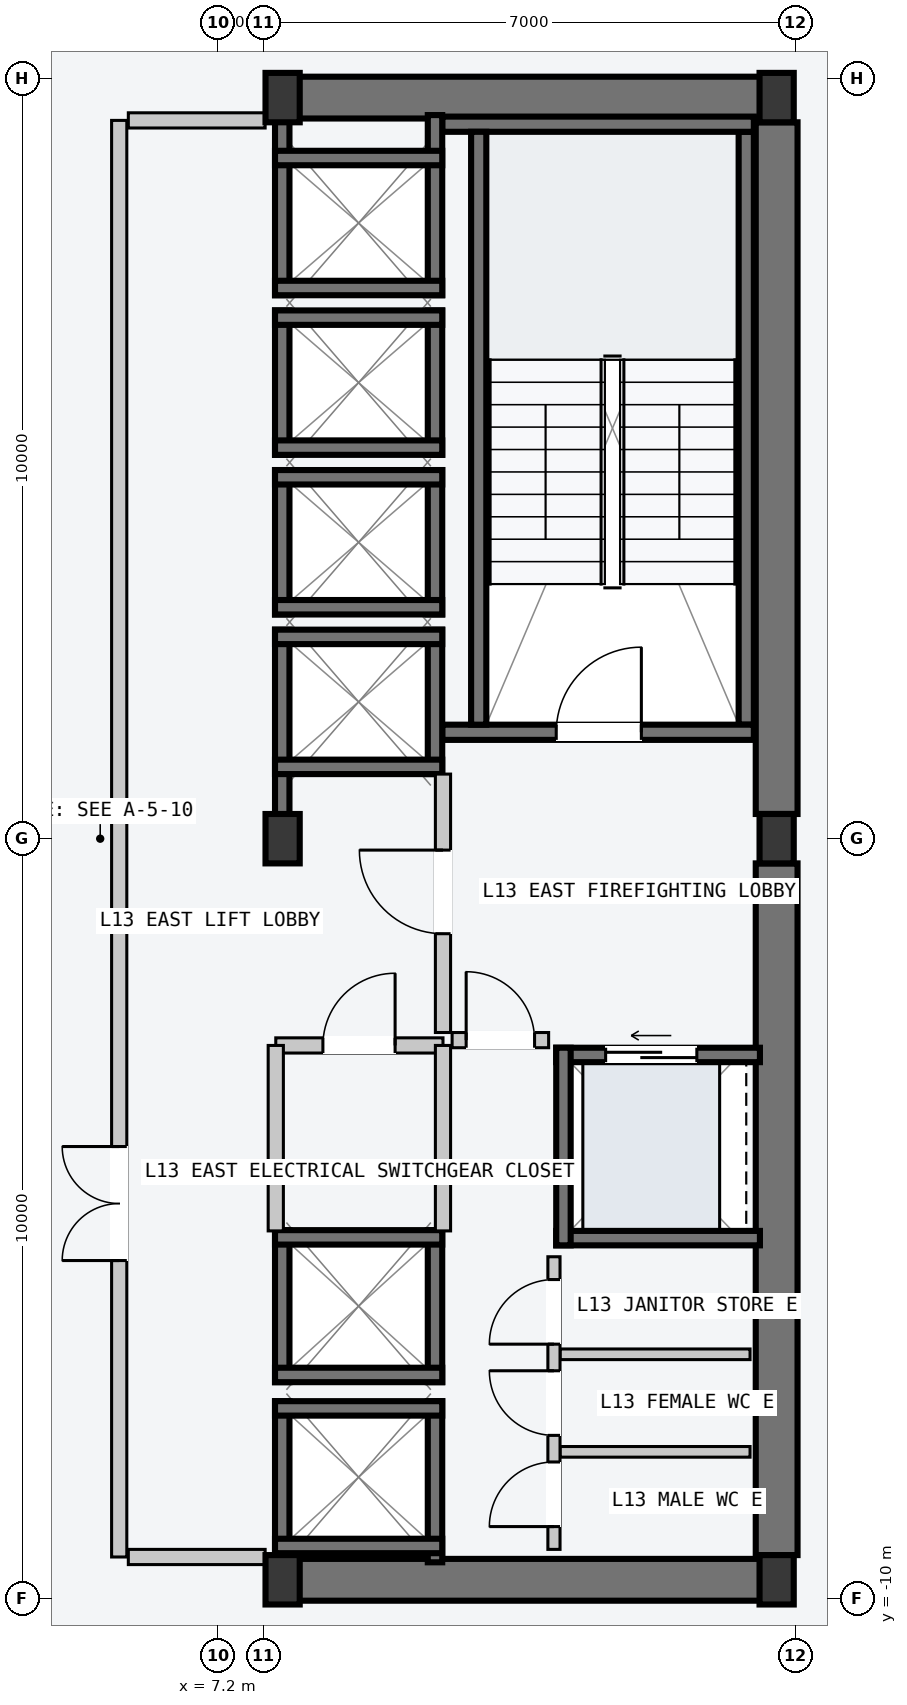
"""IFC4 building model, lengths in metres.
Left out: names, types, materials, properties, quantities, classifications, styles, units other than length and angle.
Written with IfcOpenShell. Run it as: python <this file> out.ifc"""

import sys

from ifc_helpers import new_model, si_unit, direction, frame, frame_2d, origin, origin_2d, place, context, subcontext, project, spatial, rectangle, i_section, extrude, element, fill, save


model = new_model("IFC4")
c1 = context("Model", 3, precision=1e-05, world=origin(), true_north=direction((0.0, 1.0)))
c2 = subcontext(c1, "Body", "Model", "MODEL_VIEW")
j1 = project(units=[si_unit("LENGTHUNIT", "METRE"), si_unit("PLANEANGLEUNIT", "RADIAN")], contexts=[c1])
p1 = place(None, origin())
s1 = spatial("IfcSite", under=j1, at=p1, CompositionType="ELEMENT")
p2 = place(p1, origin())
s2 = spatial("IfcBuilding", under=s1, at=p2, CompositionType="ELEMENT")
p3 = place(p2, frame((0.0, 0.0, 52.8)))
s3 = spatial("IfcBuildingStorey", under=s2, at=p3, CompositionType="ELEMENT", Elevation=52.8)
for number, where, z_axis, x_axis in (
    (1, (8.07, -9.75, -0.2), (0.0, 0.0, 1.0), (1.0, 0.0, 0.0)),
    (2, (8.07, 9.75, -0.2), (0.0, 0.0, 1.0), (1.0, 0.0, 0.0)),
):
    element("IfcWall", number, at=place(p3, frame(where, z_axis=z_axis, x_axis=x_axis)), inside=s3, PredefinedType="SHEAR", context=c2, shape_type="SweptSolid", body=[
        extrude(rectangle(XDim=6.46, YDim=0.55, at=frame_2d((3.23, 0.0))), origin(), (0.0, 0.0, 1.0), 3.6),
    ])
for number, where, z_axis, x_axis in (
    (3, (14.55, -9.425, -0.2), (0.0, 0.0, 1.0), (0.0, 1.0, 0.0)),
    (4, (14.55, 0.325, -0.2), (0.0, 0.0, 1.0), (0.0, 1.0, 0.0)),
):
    element("IfcWall", number, at=place(p3, frame(where, z_axis=z_axis, x_axis=x_axis)), inside=s3, PredefinedType="SHEAR", context=c2, shape_type="SweptSolid", body=[
        extrude(rectangle(XDim=9.1, YDim=0.55, at=frame_2d((4.55, 0.0))), origin(), (0.0, 0.0, 1.0), 3.6),
    ])
p4 = place(p3, frame((14.15, 1.5, -0.2), z_axis=(0.0, 0.0, 1.0), x_axis=(0.0, 1.0, 0.0)))
e5 = element("IfcWall", 5, at=p4, inside=s3, PredefinedType="SOLIDWALL", context=c2, shape_type="SweptSolid", body=[
    extrude(rectangle(XDim=7.8, YDim=0.2, at=frame_2d((3.9, 0.0))), origin(), (0.0, 0.0, 1.0), 3.6),
])
p5 = place(p3, frame((10.15, 1.4, -0.2), z_axis=(0.0, 0.0, 1.0), x_axis=(1.0, 0.0, 0.0)))
e6 = element("IfcWall", 6, at=p5, inside=s3, PredefinedType="SOLIDWALL", context=c2, shape_type="SweptSolid", body=[
    extrude(rectangle(XDim=4.1, YDim=0.2, at=frame_2d((2.05, 0.0))), origin(), (0.0, 0.0, 1.0), 3.6),
])
p6 = place(p5, frame((1.5, 0.0, 0.2)))
e7 = element("IfcOpeningElement", 7, at=p6, cuts=e6, PredefinedType="OPENING", context=c2, shape_type="SweptSolid", body=[
    extrude(rectangle(XDim=1.12, YDim=2.18, at=frame_2d((0.56, 1.09))), frame((0.0, 0.11, 0.0), z_axis=(0.0, -1.0, 0.0), x_axis=(1.0, 0.0, 0.0)), (0.0, 0.0, 1.0), 0.22),
])
p7 = place(p3, frame((10.15, 9.4, -0.2), z_axis=(0.0, 0.0, 1.0), x_axis=(1.0, 0.0, 0.0)))
e8 = element("IfcWall", 8, at=p7, inside=s3, PredefinedType="SOLIDWALL", context=c2, shape_type="SweptSolid", body=[
    extrude(rectangle(XDim=4.1, YDim=0.2, at=frame_2d((2.05, 0.0))), origin(), (0.0, 0.0, 1.0), 3.6),
])
p8 = place(p3, frame((10.63, 1.5, -0.2), z_axis=(0.0, 0.0, 1.0), x_axis=(0.0, 1.0, 0.0)))
e9 = element("IfcWall", 9, at=p8, inside=s3, PredefinedType="SOLIDWALL", context=c2, shape_type="SweptSolid", body=[
    extrude(rectangle(XDim=7.8, YDim=0.2, at=frame_2d((3.9, 0.0))), origin(), (0.0, 0.0, 1.0), 3.6),
])
for number, where, z_axis, x_axis in (
    (10, (8.05, -9.75, 0.0), (0.0, 0.0, 1.0), (1.0, 0.0, 0.0)),
    (11, (8.05, 0.0, 0.0), (0.0, 0.0, 1.0), (1.0, 0.0, 0.0)),
    (12, (8.05, 9.75, 0.0), (0.0, 0.0, 1.0), (1.0, 0.0, 0.0)),
    (13, (14.55, -9.75, 0.0), (0.0, 0.0, 1.0), (1.0, 0.0, 0.0)),
    (14, (14.55, 0.0, 0.0), (0.0, 0.0, 1.0), (1.0, 0.0, 0.0)),
    (15, (14.55, 9.75, 0.0), (0.0, 0.0, 1.0), (1.0, 0.0, 0.0)),
):
    element("IfcColumn", number, at=place(p3, frame(where, z_axis=z_axis, x_axis=x_axis)), inside=s3, PredefinedType="COLUMN", context=c2, shape_type="SweptSolid", body=[
        extrude(i_section(OverallWidth=0.45, OverallDepth=0.65, WebThickness=0.025, FlangeThickness=0.04, at=origin_2d()), origin(), (0.0, 0.0, 1.0), 3.6),
    ])
p9 = place(p3, frame((8.045, 0.21, -0.2), z_axis=(0.0, 0.0, 1.0), x_axis=(0.0, 1.0, 0.0)))
e16 = element("IfcWall", 16, at=p9, inside=s3, PredefinedType="SOLIDWALL", context=c2, shape_type="SweptSolid", body=[
    extrude(rectangle(XDim=2.54, YDim=0.19, at=frame_2d((1.27, 0.0))), origin(), (0.0, 0.0, 1.0), 3.6),
])
p10 = place(p3, frame((10.055, 0.85, -0.2), z_axis=(0.0, 0.0, 1.0), x_axis=(0.0, 1.0, 0.0)))
e17 = element("IfcWall", 17, at=p10, inside=s3, PredefinedType="SOLIDWALL", context=c2, shape_type="SweptSolid", body=[
    extrude(rectangle(XDim=1.9, YDim=0.19, at=frame_2d((0.95, 0.0))), origin(), (0.0, 0.0, 1.0), 3.6),
])
for number, where, z_axis, x_axis in (
    (18, (7.95, 2.655, -0.2), (0.0, 0.0, 1.0), (1.0, 0.0, 0.0)),
    (19, (7.95, 0.945, -0.2), (0.0, 0.0, 1.0), (1.0, 0.0, 0.0)),
):
    element("IfcWall", number, at=place(p3, frame(where, z_axis=z_axis, x_axis=x_axis)), inside=s3, PredefinedType="SOLIDWALL", context=c2, shape_type="SweptSolid", body=[
        extrude(rectangle(XDim=2.2, YDim=0.19, at=frame_2d((1.1, 0.0))), origin(), (0.0, 0.0, 1.0), 3.6),
    ])
for number, where, z_axis, x_axis in (
    (20, (8.045, 2.95, -0.2), (0.0, 0.0, 1.0), (0.0, 1.0, 0.0)),
    (21, (10.055, 2.95, -0.2), (0.0, 0.0, 1.0), (0.0, 1.0, 0.0)),
):
    element("IfcWall", number, at=place(p3, frame(where, z_axis=z_axis, x_axis=x_axis)), inside=s3, PredefinedType="SOLIDWALL", context=c2, shape_type="SweptSolid", body=[
        extrude(rectangle(XDim=1.9, YDim=0.19, at=frame_2d((0.95, 0.0))), origin(), (0.0, 0.0, 1.0), 3.6),
    ])
for number, where, z_axis, x_axis in (
    (22, (7.95, 4.755, -0.2), (0.0, 0.0, 1.0), (1.0, 0.0, 0.0)),
    (23, (7.95, 3.045, -0.2), (0.0, 0.0, 1.0), (1.0, 0.0, 0.0)),
):
    element("IfcWall", number, at=place(p3, frame(where, z_axis=z_axis, x_axis=x_axis)), inside=s3, PredefinedType="SOLIDWALL", context=c2, shape_type="SweptSolid", body=[
        extrude(rectangle(XDim=2.2, YDim=0.19, at=frame_2d((1.1, 0.0))), origin(), (0.0, 0.0, 1.0), 3.6),
    ])
for number, where, z_axis, x_axis in (
    (24, (8.045, 5.05, -0.2), (0.0, 0.0, 1.0), (0.0, 1.0, 0.0)),
    (25, (10.055, 5.05, -0.2), (0.0, 0.0, 1.0), (0.0, 1.0, 0.0)),
):
    element("IfcWall", number, at=place(p3, frame(where, z_axis=z_axis, x_axis=x_axis)), inside=s3, PredefinedType="SOLIDWALL", context=c2, shape_type="SweptSolid", body=[
        extrude(rectangle(XDim=1.9, YDim=0.19, at=frame_2d((0.95, 0.0))), origin(), (0.0, 0.0, 1.0), 3.6),
    ])
for number, where, z_axis, x_axis in (
    (26, (7.95, 6.855, -0.2), (0.0, 0.0, 1.0), (1.0, 0.0, 0.0)),
    (27, (7.95, 5.145, -0.2), (0.0, 0.0, 1.0), (1.0, 0.0, 0.0)),
):
    element("IfcWall", number, at=place(p3, frame(where, z_axis=z_axis, x_axis=x_axis)), inside=s3, PredefinedType="SOLIDWALL", context=c2, shape_type="SweptSolid", body=[
        extrude(rectangle(XDim=2.2, YDim=0.19, at=frame_2d((1.1, 0.0))), origin(), (0.0, 0.0, 1.0), 3.6),
    ])
for number, where, z_axis, x_axis in (
    (28, (8.045, 7.15, -0.2), (0.0, 0.0, 1.0), (0.0, 1.0, 0.0)),
    (29, (10.055, 7.15, -0.2), (0.0, 0.0, 1.0), (0.0, 1.0, 0.0)),
):
    element("IfcWall", number, at=place(p3, frame(where, z_axis=z_axis, x_axis=x_axis)), inside=s3, PredefinedType="SOLIDWALL", context=c2, shape_type="SweptSolid", body=[
        extrude(rectangle(XDim=2.37, YDim=0.19, at=frame_2d((1.185, 0.0))), origin(), (0.0, 0.0, 1.0), 3.6),
    ])
for number, where, z_axis, x_axis in (
    (30, (7.95, 8.955, -0.2), (0.0, 0.0, 1.0), (1.0, 0.0, 0.0)),
    (31, (7.95, 7.245, -0.2), (0.0, 0.0, 1.0), (1.0, 0.0, 0.0)),
):
    element("IfcWall", number, at=place(p3, frame(where, z_axis=z_axis, x_axis=x_axis)), inside=s3, PredefinedType="SOLIDWALL", context=c2, shape_type="SweptSolid", body=[
        extrude(rectangle(XDim=2.2, YDim=0.19, at=frame_2d((1.1, 0.0))), origin(), (0.0, 0.0, 1.0), 3.6),
    ])
for number, where, z_axis, x_axis in (
    (32, (8.045, -9.52, -0.2), (0.0, 0.0, 1.0), (0.0, 1.0, 0.0)),
    (33, (10.055, -9.52, -0.2), (0.0, 0.0, 1.0), (0.0, 1.0, 0.0)),
):
    element("IfcWall", number, at=place(p3, frame(where, z_axis=z_axis, x_axis=x_axis)), inside=s3, PredefinedType="SOLIDWALL", context=c2, shape_type="SweptSolid", body=[
        extrude(rectangle(XDim=2.12, YDim=0.19, at=frame_2d((1.06, 0.0))), origin(), (0.0, 0.0, 1.0), 3.6),
    ])
for number, where, z_axis, x_axis in (
    (34, (7.95, -7.495, -0.2), (0.0, 0.0, 1.0), (1.0, 0.0, 0.0)),
    (35, (7.95, -9.305, -0.2), (0.0, 0.0, 1.0), (1.0, 0.0, 0.0)),
):
    element("IfcWall", number, at=place(p3, frame(where, z_axis=z_axis, x_axis=x_axis)), inside=s3, PredefinedType="SOLIDWALL", context=c2, shape_type="SweptSolid", body=[
        extrude(rectangle(XDim=2.2, YDim=0.19, at=frame_2d((1.1, 0.0))), origin(), (0.0, 0.0, 1.0), 3.6),
    ])
for number, where, z_axis, x_axis in (
    (36, (8.045, -7.15, -0.2), (0.0, 0.0, 1.0), (0.0, 1.0, 0.0)),
    (37, (10.055, -7.15, -0.2), (0.0, 0.0, 1.0), (0.0, 1.0, 0.0)),
):
    element("IfcWall", number, at=place(p3, frame(where, z_axis=z_axis, x_axis=x_axis)), inside=s3, PredefinedType="SOLIDWALL", context=c2, shape_type="SweptSolid", body=[
        extrude(rectangle(XDim=2.0, YDim=0.19, at=frame_2d((1.0, 0.0))), origin(), (0.0, 0.0, 1.0), 3.6),
    ])
for number, where, z_axis, x_axis in (
    (38, (7.95, -5.245, -0.2), (0.0, 0.0, 1.0), (1.0, 0.0, 0.0)),
    (39, (7.95, -7.055, -0.2), (0.0, 0.0, 1.0), (1.0, 0.0, 0.0)),
):
    element("IfcWall", number, at=place(p3, frame(where, z_axis=z_axis, x_axis=x_axis)), inside=s3, PredefinedType="SOLIDWALL", context=c2, shape_type="SweptSolid", body=[
        extrude(rectangle(XDim=2.2, YDim=0.19, at=frame_2d((1.1, 0.0))), origin(), (0.0, 0.0, 1.0), 3.6),
    ])
p11 = place(p3, frame((11.65, -2.845, -0.2), z_axis=(0.0, 0.0, 1.0), x_axis=(1.0, 0.0, 0.0)))
e40 = element("IfcWall", 40, at=p11, inside=s3, PredefinedType="SOLIDWALL", context=c2, shape_type="SweptSolid", body=[
    extrude(rectangle(XDim=2.68, YDim=0.19, at=frame_2d((1.34, 0.0))), origin(), (0.0, 0.0, 1.0), 3.6),
])
p12 = place(p11, frame((0.65, 0.0, 0.2)))
e41 = element("IfcOpeningElement", 41, at=p12, cuts=e40, PredefinedType="OPENING", context=c2, shape_type="SweptSolid", body=[
    extrude(rectangle(XDim=1.2, YDim=2.2, at=frame_2d((0.6, 1.1))), frame((0.0, 0.105, 0.0), z_axis=(0.0, -1.0, 0.0), x_axis=(1.0, 0.0, 0.0)), (0.0, 0.0, 1.0), 0.21),
])
p13 = place(p3, frame((11.65, -5.255, -0.2), z_axis=(0.0, 0.0, 1.0), x_axis=(1.0, 0.0, 0.0)))
e42 = element("IfcWall", 42, at=p13, inside=s3, PredefinedType="SOLIDWALL", context=c2, shape_type="SweptSolid", body=[
    extrude(rectangle(XDim=2.68, YDim=0.19, at=frame_2d((1.34, 0.0))), origin(), (0.0, 0.0, 1.0), 3.6),
])
p14 = place(p3, frame((11.745, -5.35, -0.2), z_axis=(0.0, 0.0, 1.0), x_axis=(0.0, 1.0, 0.0)))
e43 = element("IfcWall", 43, at=p14, inside=s3, PredefinedType="SOLIDWALL", context=c2, shape_type="SweptSolid", body=[
    extrude(rectangle(XDim=2.6, YDim=0.19, at=frame_2d((1.3, 0.0))), origin(), (0.0, 0.0, 1.0), 3.6),
])
p15 = place(p3, frame((5.9, -9.45, 0.0), z_axis=(0.0, 0.0, 1.0), x_axis=(0.0, 1.0, 0.0)))
e44 = element("IfcWall", 44, at=p15, inside=s3, PredefinedType="PARTITIONING", context=c2, shape_type="SweptSolid", body=[
    extrude(rectangle(XDim=18.9, YDim=0.2, at=frame_2d((9.45, 0.0))), origin(), (0.0, 0.0, 1.0), 3.4),
])
p16 = place(p15, frame((3.9, 0.0, 0.0)))
e45 = element("IfcOpeningElement", 45, at=p16, cuts=e44, PredefinedType="OPENING", context=c2, shape_type="SweptSolid", body=[
    extrude(rectangle(XDim=1.5, YDim=2.2, at=frame_2d((0.75, 1.1))), frame((0.0, 0.11, 0.0), z_axis=(0.0, -1.0, 0.0), x_axis=(1.0, 0.0, 0.0)), (0.0, 0.0, 1.0), 0.22),
])
for number, where, z_axis, x_axis in (
    (46, (6.02, -9.45, 0.0), (0.0, 0.0, 1.0), (1.0, 0.0, 0.0)),
    (47, (6.02, 9.45, 0.0), (0.0, 0.0, 1.0), (1.0, 0.0, 0.0)),
):
    element("IfcWall", number, at=place(p3, frame(where, z_axis=z_axis, x_axis=x_axis)), inside=s3, PredefinedType="PARTITIONING", context=c2, shape_type="SweptSolid", body=[
        extrude(rectangle(XDim=1.8, YDim=0.2, at=frame_2d((0.9, 0.0))), origin(), (0.0, 0.0, 1.0), 3.4),
    ])
p17 = place(p3, frame((10.16, -2.55, 0.0), z_axis=(0.0, 0.0, 1.0), x_axis=(0.0, 1.0, 0.0)))
e48 = element("IfcWall", 48, at=p17, inside=s3, PredefinedType="PARTITIONING", context=c2, shape_type="SweptSolid", body=[
    extrude(rectangle(XDim=3.4, YDim=0.2, at=frame_2d((1.7, 0.0))), origin(), (0.0, 0.0, 1.0), 3.4),
])
p18 = place(p17, frame((1.3, 0.0, 0.0)))
e49 = element("IfcOpeningElement", 49, at=p18, cuts=e48, PredefinedType="OPENING", context=c2, shape_type="SweptSolid", body=[
    extrude(rectangle(XDim=1.1, YDim=2.15, at=frame_2d((0.55, 1.075))), frame((0.0, 0.11, 0.0), z_axis=(0.0, -1.0, 0.0), x_axis=(1.0, 0.0, 0.0)), (0.0, 0.0, 1.0), 0.22),
])
p19 = place(p3, frame((10.28, -2.65, 0.0), z_axis=(0.0, 0.0, 1.0), x_axis=(1.0, 0.0, 0.0)))
e50 = element("IfcWall", 50, at=p19, inside=s3, PredefinedType="PARTITIONING", context=c2, shape_type="SweptSolid", body=[
    extrude(rectangle(XDim=1.27, YDim=0.2, at=frame_2d((0.635, 0.0))), origin(), (0.0, 0.0, 1.0), 3.4),
])
p20 = place(p19, frame((0.185, 0.0, 0.0)))
e51 = element("IfcOpeningElement", 51, at=p20, cuts=e50, PredefinedType="OPENING", context=c2, shape_type="SweptSolid", body=[
    extrude(rectangle(XDim=0.9, YDim=2.15, at=frame_2d((0.45, 1.075))), frame((0.0, 0.11, 0.0), z_axis=(0.0, -1.0, 0.0), x_axis=(1.0, 0.0, 0.0)), (0.0, 0.0, 1.0), 0.22),
])
p21 = place(p3, frame((7.96, -2.72, 0.0), z_axis=(0.0, 0.0, 1.0), x_axis=(1.0, 0.0, 0.0)))
e52 = element("IfcWall", 52, at=p21, inside=s3, PredefinedType="PARTITIONING", context=c2, shape_type="SweptSolid", body=[
    extrude(rectangle(XDim=2.2, YDim=0.2, at=frame_2d((1.1, 0.0))), origin(), (0.0, 0.0, 1.0), 3.4),
])
p22 = place(p21, frame((0.62, 0.0, 0.0)))
e53 = element("IfcOpeningElement", 53, at=p22, cuts=e52, PredefinedType="OPENING", context=c2, shape_type="SweptSolid", body=[
    extrude(rectangle(XDim=0.95, YDim=2.1, at=frame_2d((0.475, 1.05))), frame((0.0, 0.11, 0.0), z_axis=(0.0, -1.0, 0.0), x_axis=(1.0, 0.0, 0.0)), (0.0, 0.0, 1.0), 0.22),
])
for number, where, z_axis, x_axis in (
    (54, (7.96, -5.16, 0.0), (0.0, 0.0, 1.0), (0.0, 1.0, 0.0)),
    (55, (10.16, -5.16, 0.0), (0.0, 0.0, 1.0), (0.0, 1.0, 0.0)),
):
    element("IfcWall", number, at=place(p3, frame(where, z_axis=z_axis, x_axis=x_axis)), inside=s3, PredefinedType="PARTITIONING", context=c2, shape_type="SweptSolid", body=[
        extrude(rectangle(XDim=2.44, YDim=0.2, at=frame_2d((1.22, 0.0))), origin(), (0.0, 0.0, 1.0), 3.4),
    ])
for number, where, z_axis, x_axis in (
    (56, (11.7, -8.067, 0.0), (0.0, 0.0, 1.0), (1.0, 0.0, 0.0)),
    (57, (11.7, -6.783, 0.0), (0.0, 0.0, 1.0), (1.0, 0.0, 0.0)),
):
    element("IfcWall", number, at=place(p3, frame(where, z_axis=z_axis, x_axis=x_axis)), inside=s3, PredefinedType="PARTITIONING", context=c2, shape_type="SweptSolid", body=[
        extrude(rectangle(XDim=2.5, YDim=0.14, at=frame_2d((1.25, 0.0))), origin(), (0.0, 0.0, 1.0), 3.4),
    ])
p23 = place(p3, frame((11.62, -9.35, 0.0), z_axis=(0.0, 0.0, 1.0), x_axis=(0.0, 1.0, 0.0)))
e58 = element("IfcWall", 58, at=p23, inside=s3, PredefinedType="PARTITIONING", context=c2, shape_type="SweptSolid", body=[
    extrude(rectangle(XDim=3.85, YDim=0.16, at=frame_2d((1.925, 0.0))), origin(), (0.0, 0.0, 1.0), 3.4),
])
p24 = place(p23, frame((0.3, 0.0, 0.0)))
e59 = element("IfcOpeningElement", 59, at=p24, cuts=e58, PredefinedType="OPENING", context=c2, shape_type="SweptSolid", body=[
    extrude(rectangle(XDim=0.85, YDim=2.12, at=frame_2d((0.425, 1.06))), frame((0.0, 0.09, 0.0), z_axis=(0.0, -1.0, 0.0), x_axis=(1.0, 0.0, 0.0)), (0.0, 0.0, 1.0), 0.18),
])
p25 = place(p23, frame((1.5, 0.0, 0.0)))
e60 = element("IfcOpeningElement", 60, at=p25, cuts=e58, PredefinedType="OPENING", context=c2, shape_type="SweptSolid", body=[
    extrude(rectangle(XDim=0.85, YDim=2.12, at=frame_2d((0.425, 1.06))), frame((0.0, 0.09, 0.0), z_axis=(0.0, -1.0, 0.0), x_axis=(1.0, 0.0, 0.0)), (0.0, 0.0, 1.0), 0.18),
])
p26 = place(p23, frame((2.7, 0.0, 0.0)))
e61 = element("IfcOpeningElement", 61, at=p26, cuts=e58, PredefinedType="OPENING", context=c2, shape_type="SweptSolid", body=[
    extrude(rectangle(XDim=0.85, YDim=2.12, at=frame_2d((0.425, 1.06))), frame((0.0, 0.09, 0.0), z_axis=(0.0, -1.0, 0.0), x_axis=(1.0, 0.0, 0.0)), (0.0, 0.0, 1.0), 0.18),
])
p27 = place(p6, origin())
e62 = element("IfcDoor", 62, at=p27, inside=s3, OperationType="SINGLE_SWING_RIGHT", PredefinedType="DOOR", context=c2, shape_type="SweptSolid", body=[
    extrude(rectangle(XDim=1.12, YDim=2.18, at=frame_2d((0.56, 1.09))), frame((0.0, 0.025, 0.0), z_axis=(0.0, -1.0, 0.0), x_axis=(1.0, 0.0, 0.0)), (0.0, 0.0, 1.0), 0.05),
])
fill(e7, e62)
p28 = place(p12, origin())
e63 = element("IfcDoor", 63, at=p28, inside=s3, OperationType="SLIDING_TO_LEFT", PredefinedType="DOOR", context=c2, shape_type="SweptSolid", body=[
    extrude(rectangle(XDim=1.2, YDim=2.2, at=frame_2d((0.6, 1.1))), frame((0.0, 0.025, 0.0), z_axis=(0.0, -1.0, 0.0), x_axis=(1.0, 0.0, 0.0)), (0.0, 0.0, 1.0), 0.05),
])
fill(e41, e63)
p29 = place(p16, origin())
e64 = element("IfcDoor", 64, at=p29, inside=s3, OperationType="DOUBLE_DOOR_SINGLE_SWING", PredefinedType="DOOR", context=c2, shape_type="SweptSolid", body=[
    extrude(rectangle(XDim=1.5, YDim=2.2, at=frame_2d((0.75, 1.1))), frame((0.0, 0.025, 0.0), z_axis=(0.0, -1.0, 0.0), x_axis=(1.0, 0.0, 0.0)), (0.0, 0.0, 1.0), 0.05),
])
fill(e45, e64)
p30 = place(p18, origin())
e65 = element("IfcDoor", 65, at=p30, inside=s3, OperationType="SINGLE_SWING_RIGHT", PredefinedType="DOOR", context=c2, shape_type="SweptSolid", body=[
    extrude(rectangle(XDim=1.1, YDim=2.15, at=frame_2d((0.55, 1.075))), frame((0.0, 0.025, 0.0), z_axis=(0.0, -1.0, 0.0), x_axis=(1.0, 0.0, 0.0)), (0.0, 0.0, 1.0), 0.05),
])
fill(e49, e65)
p31 = place(p20, origin())
e66 = element("IfcDoor", 66, at=p31, inside=s3, OperationType="SINGLE_SWING_LEFT", PredefinedType="DOOR", context=c2, shape_type="SweptSolid", body=[
    extrude(rectangle(XDim=0.9, YDim=2.15, at=frame_2d((0.45, 1.075))), frame((0.0, 0.025, 0.0), z_axis=(0.0, -1.0, 0.0), x_axis=(1.0, 0.0, 0.0)), (0.0, 0.0, 1.0), 0.05),
])
fill(e51, e66)
p32 = place(p22, origin())
e67 = element("IfcDoor", 67, at=p32, inside=s3, OperationType="SINGLE_SWING_RIGHT", PredefinedType="DOOR", context=c2, shape_type="SweptSolid", body=[
    extrude(rectangle(XDim=0.95, YDim=2.1, at=frame_2d((0.475, 1.05))), frame((0.0, 0.025, 0.0), z_axis=(0.0, -1.0, 0.0), x_axis=(1.0, 0.0, 0.0)), (0.0, 0.0, 1.0), 0.05),
])
fill(e53, e67)
p33 = place(p24, origin())
e68 = element("IfcDoor", 68, at=p33, inside=s3, OperationType="SINGLE_SWING_LEFT", PredefinedType="DOOR", context=c2, shape_type="SweptSolid", body=[
    extrude(rectangle(XDim=0.85, YDim=2.12, at=frame_2d((0.425, 1.06))), frame((0.0, 0.025, 0.0), z_axis=(0.0, -1.0, 0.0), x_axis=(1.0, 0.0, 0.0)), (0.0, 0.0, 1.0), 0.05),
])
fill(e59, e68)
p34 = place(p25, origin())
e69 = element("IfcDoor", 69, at=p34, inside=s3, OperationType="SINGLE_SWING_RIGHT", PredefinedType="DOOR", context=c2, shape_type="SweptSolid", body=[
    extrude(rectangle(XDim=0.85, YDim=2.12, at=frame_2d((0.425, 1.06))), frame((0.0, 0.025, 0.0), z_axis=(0.0, -1.0, 0.0), x_axis=(1.0, 0.0, 0.0)), (0.0, 0.0, 1.0), 0.05),
])
fill(e60, e69)
p35 = place(p26, origin())
e70 = element("IfcDoor", 70, at=p35, inside=s3, OperationType="SINGLE_SWING_LEFT", PredefinedType="DOOR", context=c2, shape_type="SweptSolid", body=[
    extrude(rectangle(XDim=0.85, YDim=2.12, at=frame_2d((0.425, 1.06))), frame((0.0, 0.025, 0.0), z_axis=(0.0, -1.0, 0.0), x_axis=(1.0, 0.0, 0.0)), (0.0, 0.0, 1.0), 0.05),
])
fill(e61, e70)
save(model, sys.argv[1])
